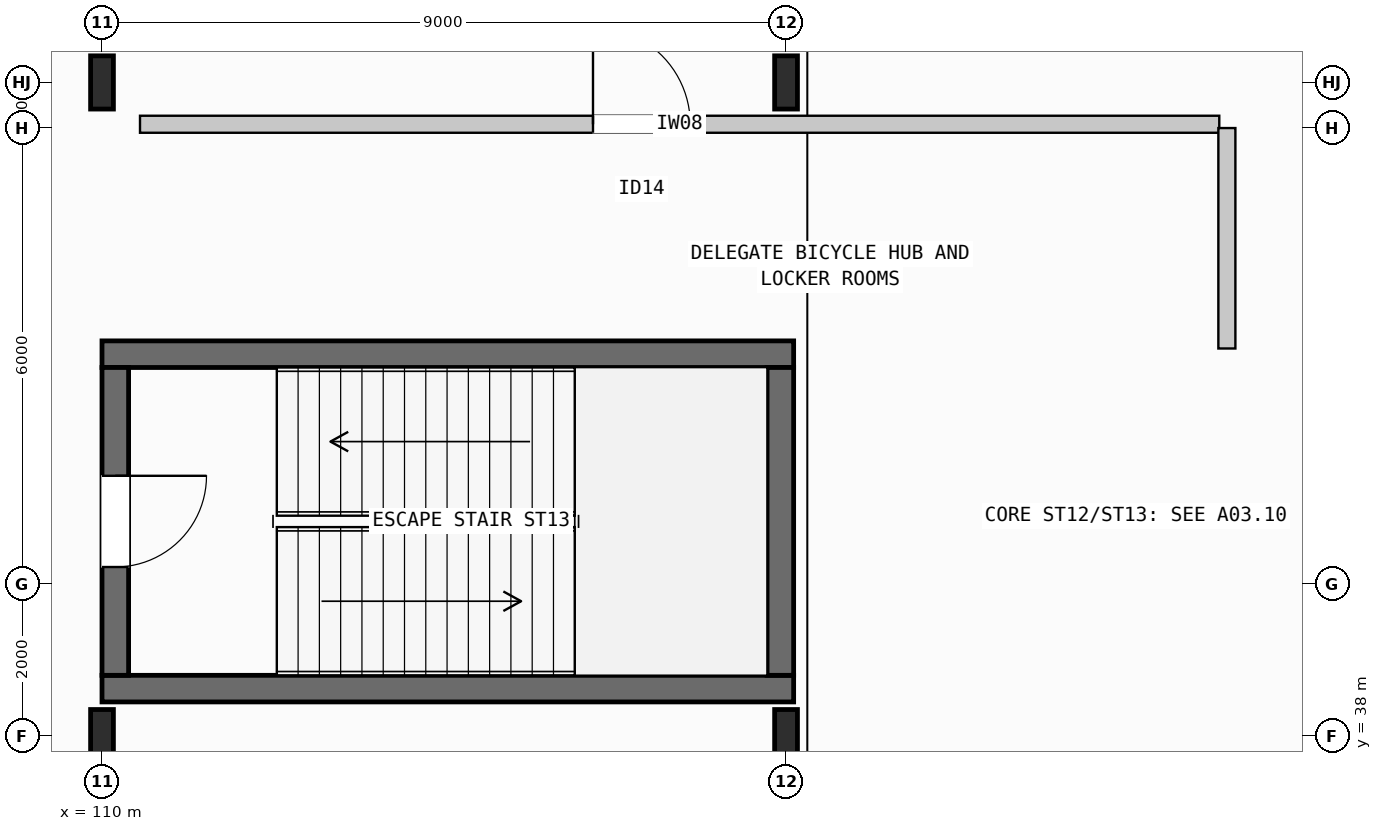
"""IFC4 building model, lengths in metres.
Left out: names, types, materials, properties, quantities, classifications, styles, units other than length and angle.
Written with IfcOpenShell. Run it as: python <this file> out.ifc"""

import sys

from ifc_helpers import new_model, si_unit, direction, frame, frame_2d, origin, origin_2d, place, context, subcontext, project, spatial, rectangle, i_section, extrude, element, fill, save


model = new_model("IFC4")
c1 = context("Model", 3, precision=1e-05, world=origin(), true_north=direction((0.0, 1.0)))
c2 = subcontext(c1, "Body", "Model", "MODEL_VIEW")
j1 = project(units=[si_unit("LENGTHUNIT", "METRE"), si_unit("PLANEANGLEUNIT", "RADIAN")], contexts=[c1])
p1 = place(None, origin())
s1 = spatial("IfcSite", under=j1, at=p1, CompositionType="ELEMENT")
p2 = place(p1, origin())
s2 = spatial("IfcBuilding", under=s1, at=p2, CompositionType="ELEMENT")
p3 = place(p2, frame((0.0, 0.0, -5.4)))
s3 = spatial("IfcBuildingStorey", under=s2, at=p3, CompositionType="ELEMENT", Elevation=-5.4)
for number, where, z_axis, x_axis in (
    (1, (110.0, 38.0, 0.0), (0.0, 0.0, 1.0), (1.0, 0.0, 0.0)),
    (2, (110.0, 46.6, 0.0), (0.0, 0.0, 1.0), (1.0, 0.0, 0.0)),
    (3, (119.0, 38.0, 0.0), (0.0, 0.0, 1.0), (1.0, 0.0, 0.0)),
    (4, (119.0, 46.6, 0.0), (0.0, 0.0, 1.0), (1.0, 0.0, 0.0)),
):
    element("IfcColumn", number, at=place(p3, frame(where, z_axis=z_axis, x_axis=x_axis)), inside=s3, PredefinedType="COLUMN", context=c2, shape_type="SweptSolid", body=[
        extrude(i_section(OverallWidth=0.3, OverallDepth=0.7, WebThickness=0.017, FlangeThickness=0.032, FilletRadius=0.027, at=origin_2d()), origin(), (0.0, 0.0, 1.0), 5.4),
    ])
for number, where, z_axis, x_axis in (
    (5, (110.0, 38.625, 0.0), (0.0, 0.0, 1.0), (1.0, 0.0, 0.0)),
    (6, (110.0, 43.025, 0.0), (0.0, 0.0, 1.0), (1.0, 0.0, 0.0)),
):
    element("IfcWall", number, at=place(p3, frame(where, z_axis=z_axis, x_axis=x_axis)), inside=s3, PredefinedType="SHEAR", context=c2, shape_type="SweptSolid", body=[
        extrude(rectangle(XDim=9.1, YDim=0.35, at=frame_2d((4.55, 0.0))), origin(), (0.0, 0.0, 1.0), 5.4),
    ])
p4 = place(p3, frame((110.175, 38.8, 0.0), z_axis=(0.0, 0.0, 1.0), x_axis=(0.0, 1.0, 0.0)))
e7 = element("IfcWall", 7, at=p4, inside=s3, PredefinedType="SHEAR", context=c2, shape_type="SweptSolid", body=[
    extrude(rectangle(XDim=4.05, YDim=0.35, at=frame_2d((2.025, 0.0))), origin(), (0.0, 0.0, 1.0), 5.4),
])
p5 = place(p4, frame((1.425, 0.0, 0.0)))
e8 = element("IfcOpeningElement", 8, at=p5, cuts=e7, PredefinedType="OPENING", context=c2, shape_type="SweptSolid", body=[
    extrude(rectangle(XDim=1.2, YDim=2.2, at=frame_2d((0.6, 1.1))), frame((0.0, 0.185, 0.0), z_axis=(0.0, -1.0, 0.0), x_axis=(1.0, 0.0, 0.0)), (0.0, 0.0, 1.0), 0.37),
])
p6 = place(p3, frame((118.925, 38.8, 0.0), z_axis=(0.0, 0.0, 1.0), x_axis=(0.0, 1.0, 0.0)))
e9 = element("IfcWall", 9, at=p6, inside=s3, PredefinedType="SHEAR", context=c2, shape_type="SweptSolid", body=[
    extrude(rectangle(XDim=4.05, YDim=0.35, at=frame_2d((2.025, 0.0))), origin(), (0.0, 0.0, 1.0), 5.4),
])
p7 = place(p3, frame((110.5, 46.05, 0.0), z_axis=(0.0, 0.0, 1.0), x_axis=(1.0, 0.0, 0.0)))
e10 = element("IfcWall", 10, at=p7, inside=s3, PredefinedType="PARTITIONING", context=c2, shape_type="SweptSolid", body=[
    extrude(rectangle(XDim=14.2, YDim=0.224, at=frame_2d((7.1, 0.0))), origin(), (0.0, 0.0, 1.0), 4.4),
])
p8 = place(p7, frame((5.96, 0.0, 0.0)))
e11 = element("IfcOpeningElement", 11, at=p8, cuts=e10, PredefinedType="OPENING", context=c2, shape_type="SweptSolid", body=[
    extrude(rectangle(XDim=1.28, YDim=2.24, at=frame_2d((0.64, 1.12))), frame((0.0, 0.122, 0.0), z_axis=(0.0, -1.0, 0.0), x_axis=(1.0, 0.0, 0.0)), (0.0, 0.0, 1.0), 0.244),
])
p9 = place(p3, frame((124.8, 43.1, 0.0), z_axis=(0.0, 0.0, 1.0), x_axis=(0.0, 1.0, 0.0)))
e12 = element("IfcWall", 12, at=p9, inside=s3, PredefinedType="PARTITIONING", context=c2, shape_type="SweptSolid", body=[
    extrude(rectangle(XDim=2.9, YDim=0.224, at=frame_2d((1.45, 0.0))), origin(), (0.0, 0.0, 1.0), 4.4),
])
p10 = place(p5, frame((1.2, 0.0, 0.0), z_axis=(0.0, 0.0, 1.0), x_axis=(-1.0, 0.0, 0.0)))
e13 = element("IfcDoor", 13, at=p10, inside=s3, OperationType="SINGLE_SWING_LEFT", PredefinedType="DOOR", context=c2, shape_type="SweptSolid", body=[
    extrude(rectangle(XDim=1.2, YDim=2.2, at=frame_2d((0.6, 1.1))), frame((0.0, 0.025, 0.0), z_axis=(0.0, -1.0, 0.0), x_axis=(1.0, 0.0, 0.0)), (0.0, 0.0, 1.0), 0.05),
])
fill(e8, e13)
p11 = place(p8, origin())
e14 = element("IfcDoor", 14, at=p11, inside=s3, OperationType="SINGLE_SWING_LEFT", PredefinedType="DOOR", context=c2, shape_type="SweptSolid", body=[
    extrude(rectangle(XDim=1.28, YDim=2.24, at=frame_2d((0.64, 1.12))), frame((0.0, 0.025, 0.0), z_axis=(0.0, -1.0, 0.0), x_axis=(1.0, 0.0, 0.0)), (0.0, 0.0, 1.0), 0.05),
])
fill(e11, e14)
save(model, sys.argv[1])
